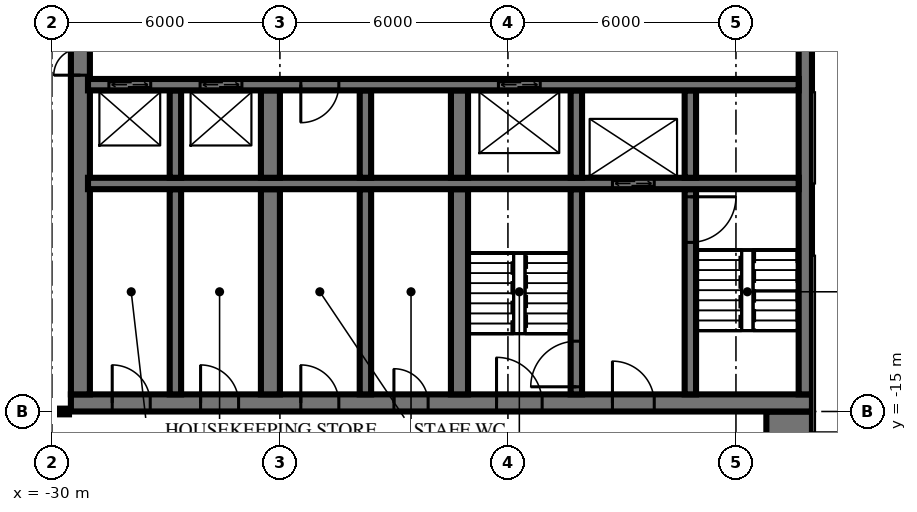
"""IFC4 building model, lengths in metres.
Left out: names, types, materials, properties, quantities, classifications, styles, units other than length and angle.
Written with IfcOpenShell. Run it as: python <this file> out.ifc"""

import sys

from ifc_helpers import new_model, si_unit, direction, frame, frame_2d, origin, place, context, subcontext, project, spatial, rectangle, extrude, element, fill, save


model = new_model("IFC4")
c1 = context("Model", 3, precision=1e-05, world=origin(), true_north=direction((0.0, 1.0)))
c2 = subcontext(c1, "Body", "Model", "MODEL_VIEW")
j1 = project(units=[si_unit("LENGTHUNIT", "METRE"), si_unit("PLANEANGLEUNIT", "RADIAN")], contexts=[c1])
p1 = place(None, origin())
s1 = spatial("IfcSite", under=j1, at=p1, CompositionType="ELEMENT")
p2 = place(p1, origin())
s2 = spatial("IfcBuilding", under=s1, at=p2, CompositionType="ELEMENT")
p3 = place(p2, frame((0.0, 0.0, 7.0)))
s3 = spatial("IfcBuildingStorey", under=s2, at=p3, CompositionType="ELEMENT", Elevation=7.0)
p4 = place(p3, frame((-29.5, -14.775, 0.0), z_axis=(0.0, 0.0, 1.0), x_axis=(1.0, 0.0, 0.0)))
e1 = element("IfcWall", 1, at=p4, inside=s3, PredefinedType="SHEAR", context=c2, shape_type="SweptSolid", body=[
    extrude(rectangle(XDim=19.5, YDim=0.45, at=frame_2d((9.75, 0.0))), origin(), (0.0, 0.0, 1.0), 5.5),
])
p5 = place(p4, frame((11.2, 0.0, 0.0)))
e2 = element("IfcOpeningElement", 2, at=p5, cuts=e1, PredefinedType="OPENING", context=c2, shape_type="SweptSolid", body=[
    extrude(rectangle(XDim=1.2, YDim=2.1, at=frame_2d((0.6, 1.05))), frame((0.0, 0.235, 0.0), z_axis=(0.0, -1.0, 0.0), x_axis=(1.0, 0.0, 0.0)), (0.0, 0.0, 1.0), 0.47),
])
p6 = place(p4, frame((14.25, 0.0, 0.0)))
e3 = element("IfcOpeningElement", 3, at=p6, cuts=e1, PredefinedType="OPENING", context=c2, shape_type="SweptSolid", body=[
    extrude(rectangle(XDim=1.1, YDim=2.1, at=frame_2d((0.55, 1.05))), frame((0.0, 0.235, 0.0), z_axis=(0.0, -1.0, 0.0), x_axis=(1.0, 0.0, 0.0)), (0.0, 0.0, 1.0), 0.47),
])
p7 = place(p4, frame((8.5, 0.0, 0.0)))
e4 = element("IfcOpeningElement", 4, at=p7, cuts=e1, PredefinedType="OPENING", context=c2, shape_type="SweptSolid", body=[
    extrude(rectangle(XDim=0.9, YDim=2.1, at=frame_2d((0.45, 1.05))), frame((0.0, 0.235, 0.0), z_axis=(0.0, -1.0, 0.0), x_axis=(1.0, 0.0, 0.0)), (0.0, 0.0, 1.0), 0.47),
])
p8 = place(p4, frame((6.05, 0.0, 0.0)))
e5 = element("IfcOpeningElement", 5, at=p8, cuts=e1, PredefinedType="OPENING", context=c2, shape_type="SweptSolid", body=[
    extrude(rectangle(XDim=1.0, YDim=2.1, at=frame_2d((0.5, 1.05))), frame((0.0, 0.235, 0.0), z_axis=(0.0, -1.0, 0.0), x_axis=(1.0, 0.0, 0.0)), (0.0, 0.0, 1.0), 0.47),
])
p9 = place(p4, frame((3.413, 0.0, 0.0)))
e6 = element("IfcOpeningElement", 6, at=p9, cuts=e1, PredefinedType="OPENING", context=c2, shape_type="SweptSolid", body=[
    extrude(rectangle(XDim=1.0, YDim=2.1, at=frame_2d((0.5, 1.05))), frame((0.0, 0.235, 0.0), z_axis=(0.0, -1.0, 0.0), x_axis=(1.0, 0.0, 0.0)), (0.0, 0.0, 1.0), 0.47),
])
p10 = place(p4, frame((1.087, 0.0, 0.0)))
e7 = element("IfcOpeningElement", 7, at=p10, cuts=e1, PredefinedType="OPENING", context=c2, shape_type="SweptSolid", body=[
    extrude(rectangle(XDim=1.0, YDim=2.1, at=frame_2d((0.5, 1.05))), frame((0.0, 0.235, 0.0), z_axis=(0.0, -1.0, 0.0), x_axis=(1.0, 0.0, 0.0)), (0.0, 0.0, 1.0), 0.47),
])
p11 = place(p3, frame((-10.175, -14.55, 0.0), z_axis=(0.0, 0.0, 1.0), x_axis=(0.0, 1.0, 0.0)))
e8 = element("IfcWall", 8, at=p11, inside=s3, PredefinedType="SHEAR", context=c2, shape_type="SweptSolid", body=[
    extrude(rectangle(XDim=14.1, YDim=0.35, at=frame_2d((7.05, 0.0))), origin(), (0.0, 0.0, 1.0), 5.5),
])
p12 = place(p3, frame((-29.25, -14.55, 0.0), z_axis=(0.0, 0.0, 1.0), x_axis=(0.0, 1.0, 0.0)))
e9 = element("IfcWall", 9, at=p12, inside=s3, PredefinedType="SHEAR", context=c2, shape_type="SweptSolid", body=[
    extrude(rectangle(XDim=14.1, YDim=0.5, at=frame_2d((7.05, 0.0))), origin(), (0.0, 0.0, 1.0), 5.5),
])
p13 = place(p12, frame((8.4, 0.0, 0.0)))
e10 = element("IfcOpeningElement", 10, at=p13, cuts=e9, PredefinedType="OPENING", context=c2, shape_type="SweptSolid", body=[
    extrude(rectangle(XDim=1.4, YDim=2.4, at=frame_2d((0.7, 1.2))), frame((0.0, 0.26, 0.0), z_axis=(0.0, -1.0, 0.0), x_axis=(1.0, 0.0, 0.0)), (0.0, 0.0, 1.0), 0.52),
])
p14 = place(p12, frame((10.0, 0.0, 0.0)))
e11 = element("IfcOpeningElement", 11, at=p14, cuts=e9, PredefinedType="OPENING", context=c2, shape_type="SweptSolid", body=[
    extrude(rectangle(XDim=1.4, YDim=2.4, at=frame_2d((0.7, 1.2))), frame((0.0, 0.26, 0.0), z_axis=(0.0, -1.0, 0.0), x_axis=(1.0, 0.0, 0.0)), (0.0, 0.0, 1.0), 0.52),
])
p15 = place(p3, frame((-29.05, -6.4, 0.0), z_axis=(0.0, 0.0, 1.0), x_axis=(1.0, 0.0, 0.0)))
e12 = element("IfcWall", 12, at=p15, inside=s3, PredefinedType="SHEAR", context=c2, shape_type="SweptSolid", body=[
    extrude(rectangle(XDim=18.7, YDim=0.3, at=frame_2d((9.35, 0.0))), origin(), (0.0, 0.0, 1.0), 5.5),
])
p16 = place(p15, frame((2.95, 0.0, 0.0)))
e13 = element("IfcOpeningElement", 13, at=p16, cuts=e12, PredefinedType="OPENING", context=c2, shape_type="SweptSolid", body=[
    extrude(rectangle(XDim=1.1, YDim=2.1, at=frame_2d((0.55, 1.05))), frame((0.0, 0.16, 0.0), z_axis=(0.0, -1.0, 0.0), x_axis=(1.0, 0.0, 0.0)), (0.0, 0.0, 1.0), 0.32),
])
p17 = place(p15, frame((0.55, 0.0, 0.0)))
e14 = element("IfcOpeningElement", 14, at=p17, cuts=e12, PredefinedType="OPENING", context=c2, shape_type="SweptSolid", body=[
    extrude(rectangle(XDim=1.1, YDim=2.1, at=frame_2d((0.55, 1.05))), frame((0.0, 0.16, 0.0), z_axis=(0.0, -1.0, 0.0), x_axis=(1.0, 0.0, 0.0)), (0.0, 0.0, 1.0), 0.32),
])
p18 = place(p15, frame((10.8, 0.0, 0.0)))
e15 = element("IfcOpeningElement", 15, at=p18, cuts=e12, PredefinedType="OPENING", context=c2, shape_type="SweptSolid", body=[
    extrude(rectangle(XDim=1.1, YDim=2.1, at=frame_2d((0.55, 1.05))), frame((0.0, 0.16, 0.0), z_axis=(0.0, -1.0, 0.0), x_axis=(1.0, 0.0, 0.0)), (0.0, 0.0, 1.0), 0.32),
])
p19 = place(p15, frame((5.6, 0.0, 0.0)))
e16 = element("IfcOpeningElement", 16, at=p19, cuts=e12, PredefinedType="OPENING", context=c2, shape_type="SweptSolid", body=[
    extrude(rectangle(XDim=1.0, YDim=2.1, at=frame_2d((0.5, 1.05))), frame((0.0, 0.16, 0.0), z_axis=(0.0, -1.0, 0.0), x_axis=(1.0, 0.0, 0.0)), (0.0, 0.0, 1.0), 0.32),
])
p20 = place(p3, frame((-29.05, -9.0, 0.0), z_axis=(0.0, 0.0, 1.0), x_axis=(1.0, 0.0, 0.0)))
e17 = element("IfcWall", 17, at=p20, inside=s3, PredefinedType="SHEAR", context=c2, shape_type="SweptSolid", body=[
    extrude(rectangle(XDim=18.7, YDim=0.3, at=frame_2d((9.35, 0.0))), origin(), (0.0, 0.0, 1.0), 5.5),
])
p21 = place(p20, frame((13.8, 0.0, 0.0)))
e18 = element("IfcOpeningElement", 18, at=p21, cuts=e17, PredefinedType="OPENING", context=c2, shape_type="SweptSolid", body=[
    extrude(rectangle(XDim=1.1, YDim=2.1, at=frame_2d((0.55, 1.05))), frame((0.0, 0.16, 0.0), z_axis=(0.0, -1.0, 0.0), x_axis=(1.0, 0.0, 0.0)), (0.0, 0.0, 1.0), 0.32),
])
p22 = place(p3, frame((-13.2, -8.85, 0.0), z_axis=(0.0, 0.0, 1.0), x_axis=(0.0, 1.0, 0.0)))
e19 = element("IfcWall", 19, at=p22, inside=s3, PredefinedType="SHEAR", context=c2, shape_type="SweptSolid", body=[
    extrude(rectangle(XDim=2.3, YDim=0.3, at=frame_2d((1.15, 0.0))), origin(), (0.0, 0.0, 1.0), 5.5),
])
p23 = place(p3, frame((-13.2, -14.55, 0.0), z_axis=(0.0, 0.0, 1.0), x_axis=(0.0, 1.0, 0.0)))
e20 = element("IfcWall", 20, at=p23, inside=s3, PredefinedType="SHEAR", context=c2, shape_type="SweptSolid", body=[
    extrude(rectangle(XDim=5.4, YDim=0.3, at=frame_2d((2.7, 0.0))), origin(), (0.0, 0.0, 1.0), 5.5),
])
p24 = place(p23, frame((4.0, 0.0, 0.0)))
e21 = element("IfcOpeningElement", 21, at=p24, cuts=e20, PredefinedType="OPENING", context=c2, shape_type="SweptSolid", body=[
    extrude(rectangle(XDim=1.2, YDim=2.1, at=frame_2d((0.6, 1.05))), frame((0.0, 0.16, 0.0), z_axis=(0.0, -1.0, 0.0), x_axis=(1.0, 0.0, 0.0)), (0.0, 0.0, 1.0), 0.32),
])
p25 = place(p3, frame((-16.2, -8.85, 0.0), z_axis=(0.0, 0.0, 1.0), x_axis=(0.0, 1.0, 0.0)))
e22 = element("IfcWall", 22, at=p25, inside=s3, PredefinedType="SHEAR", context=c2, shape_type="SweptSolid", body=[
    extrude(rectangle(XDim=2.3, YDim=0.3, at=frame_2d((1.15, 0.0))), origin(), (0.0, 0.0, 1.0), 5.5),
])
p26 = place(p3, frame((-16.2, -14.55, 0.0), z_axis=(0.0, 0.0, 1.0), x_axis=(0.0, 1.0, 0.0)))
e23 = element("IfcWall", 23, at=p26, inside=s3, PredefinedType="SHEAR", context=c2, shape_type="SweptSolid", body=[
    extrude(rectangle(XDim=5.4, YDim=0.3, at=frame_2d((2.7, 0.0))), origin(), (0.0, 0.0, 1.0), 5.5),
])
p27 = place(p26, frame((0.2, 0.0, 0.0)))
e24 = element("IfcOpeningElement", 24, at=p27, cuts=e23, PredefinedType="OPENING", context=c2, shape_type="SweptSolid", body=[
    extrude(rectangle(XDim=1.2, YDim=2.1, at=frame_2d((0.6, 1.05))), frame((0.0, 0.16, 0.0), z_axis=(0.0, -1.0, 0.0), x_axis=(1.0, 0.0, 0.0)), (0.0, 0.0, 1.0), 0.32),
])
p28 = place(p3, frame((-19.275, -8.85, 0.0), z_axis=(0.0, 0.0, 1.0), x_axis=(0.0, 1.0, 0.0)))
e25 = element("IfcWall", 25, at=p28, inside=s3, PredefinedType="SHEAR", context=c2, shape_type="SweptSolid", body=[
    extrude(rectangle(XDim=2.3, YDim=0.45, at=frame_2d((1.15, 0.0))), origin(), (0.0, 0.0, 1.0), 5.5),
])
p29 = place(p3, frame((-19.275, -14.55, 0.0), z_axis=(0.0, 0.0, 1.0), x_axis=(0.0, 1.0, 0.0)))
e26 = element("IfcWall", 26, at=p29, inside=s3, PredefinedType="SHEAR", context=c2, shape_type="SweptSolid", body=[
    extrude(rectangle(XDim=5.4, YDim=0.45, at=frame_2d((2.7, 0.0))), origin(), (0.0, 0.0, 1.0), 5.5),
])
p30 = place(p3, frame((-21.75, -8.85, 0.0), z_axis=(0.0, 0.0, 1.0), x_axis=(0.0, 1.0, 0.0)))
e27 = element("IfcWall", 27, at=p30, inside=s3, PredefinedType="SHEAR", context=c2, shape_type="SweptSolid", body=[
    extrude(rectangle(XDim=2.3, YDim=0.3, at=frame_2d((1.15, 0.0))), origin(), (0.0, 0.0, 1.0), 5.5),
])
p31 = place(p3, frame((-21.75, -14.55, 0.0), z_axis=(0.0, 0.0, 1.0), x_axis=(0.0, 1.0, 0.0)))
e28 = element("IfcWall", 28, at=p31, inside=s3, PredefinedType="SHEAR", context=c2, shape_type="SweptSolid", body=[
    extrude(rectangle(XDim=5.4, YDim=0.3, at=frame_2d((2.7, 0.0))), origin(), (0.0, 0.0, 1.0), 5.5),
])
p32 = place(p3, frame((-24.25, -8.85, 0.0), z_axis=(0.0, 0.0, 1.0), x_axis=(0.0, 1.0, 0.0)))
e29 = element("IfcWall", 29, at=p32, inside=s3, PredefinedType="SHEAR", context=c2, shape_type="SweptSolid", body=[
    extrude(rectangle(XDim=2.3, YDim=0.5, at=frame_2d((1.15, 0.0))), origin(), (0.0, 0.0, 1.0), 5.5),
])
p33 = place(p3, frame((-24.25, -14.55, 0.0), z_axis=(0.0, 0.0, 1.0), x_axis=(0.0, 1.0, 0.0)))
e30 = element("IfcWall", 30, at=p33, inside=s3, PredefinedType="SHEAR", context=c2, shape_type="SweptSolid", body=[
    extrude(rectangle(XDim=5.4, YDim=0.5, at=frame_2d((2.7, 0.0))), origin(), (0.0, 0.0, 1.0), 5.5),
])
p34 = place(p3, frame((-26.75, -8.85, 0.0), z_axis=(0.0, 0.0, 1.0), x_axis=(0.0, 1.0, 0.0)))
e31 = element("IfcWall", 31, at=p34, inside=s3, PredefinedType="SHEAR", context=c2, shape_type="SweptSolid", body=[
    extrude(rectangle(XDim=2.3, YDim=0.3, at=frame_2d((1.15, 0.0))), origin(), (0.0, 0.0, 1.0), 5.5),
])
p35 = place(p3, frame((-26.75, -14.55, 0.0), z_axis=(0.0, 0.0, 1.0), x_axis=(0.0, 1.0, 0.0)))
e32 = element("IfcWall", 32, at=p35, inside=s3, PredefinedType="SHEAR", context=c2, shape_type="SweptSolid", body=[
    extrude(rectangle(XDim=5.4, YDim=0.3, at=frame_2d((2.7, 0.0))), origin(), (0.0, 0.0, 1.0), 5.5),
])
p36 = place(p3, frame((-10.6, -40.0, 0.0), z_axis=(0.0, 0.0, 1.0), x_axis=(0.0, 1.0, 0.0)))
e33 = element("IfcWall", 33, at=p36, inside=s3, PredefinedType="SHEAR", context=c2, shape_type="SweptSolid", body=[
    extrude(rectangle(XDim=25.0, YDim=1.2, at=frame_2d((12.5, 0.0))), origin(), (0.0, 0.0, 1.0), 5.5),
])
p37 = place(p3, frame((-47.82, -15.0, 0.0), z_axis=(0.0, 0.0, 1.0), x_axis=(1.0, 0.0, 0.0)))
e34 = element("IfcWall", 34, at=p37, inside=s3, PredefinedType="PARTITIONING", context=c2, shape_type="SweptSolid", body=[
    extrude(rectangle(XDim=18.27, YDim=0.15, at=frame_2d((9.135, 0.0))), origin(), (0.0, 0.0, 1.0), 5.05),
])
p38 = place(p37, frame((1.62, 0.0, 0.0)))
e35 = element("IfcOpeningElement", 35, at=p38, cuts=e34, PredefinedType="OPENING", context=c2, shape_type="SweptSolid", body=[
    extrude(rectangle(XDim=1.0, YDim=2.1, at=frame_2d((0.5, 1.05))), frame((0.0, 0.085, 0.0), z_axis=(0.0, -1.0, 0.0), x_axis=(1.0, 0.0, 0.0)), (0.0, 0.0, 1.0), 0.17),
])
p39 = place(p37, frame((3.84, 0.0, 0.0)))
e36 = element("IfcOpeningElement", 36, at=p39, cuts=e34, PredefinedType="OPENING", context=c2, shape_type="SweptSolid", body=[
    extrude(rectangle(XDim=1.0, YDim=2.1, at=frame_2d((0.5, 1.05))), frame((0.0, 0.085, 0.0), z_axis=(0.0, -1.0, 0.0), x_axis=(1.0, 0.0, 0.0)), (0.0, 0.0, 1.0), 0.17),
])
p40 = place(p37, frame((8.34, 0.0, 0.0)))
e37 = element("IfcOpeningElement", 37, at=p40, cuts=e34, PredefinedType="OPENING", context=c2, shape_type="SweptSolid", body=[
    extrude(rectangle(XDim=1.0, YDim=2.1, at=frame_2d((0.5, 1.05))), frame((0.0, 0.085, 0.0), z_axis=(0.0, -1.0, 0.0), x_axis=(1.0, 0.0, 0.0)), (0.0, 0.0, 1.0), 0.17),
])
p41 = place(p37, frame((13.39, 0.0, 0.0)))
e38 = element("IfcOpeningElement", 38, at=p41, cuts=e34, PredefinedType="OPENING", context=c2, shape_type="SweptSolid", body=[
    extrude(rectangle(XDim=1.0, YDim=2.1, at=frame_2d((0.5, 1.05))), frame((0.0, 0.085, 0.0), z_axis=(0.0, -1.0, 0.0), x_axis=(1.0, 0.0, 0.0)), (0.0, 0.0, 1.0), 0.17),
])
p42 = place(p37, frame((16.62, 0.0, 0.0)))
e39 = element("IfcOpeningElement", 39, at=p42, cuts=e34, PredefinedType="OPENING", context=c2, shape_type="SweptSolid", body=[
    extrude(rectangle(XDim=1.0, YDim=2.1, at=frame_2d((0.5, 1.05))), frame((0.0, 0.085, 0.0), z_axis=(0.0, -1.0, 0.0), x_axis=(1.0, 0.0, 0.0)), (0.0, 0.0, 1.0), 0.17),
])
p43 = place(p16, origin())
e40 = element("IfcDoor", 40, at=p43, inside=s3, OperationType="DOUBLE_DOOR_SLIDING", PredefinedType="USERDEFINED", context=c2, shape_type="SweptSolid", body=[
    extrude(rectangle(XDim=1.1, YDim=2.1, at=frame_2d((0.55, 1.05))), frame((0.0, 0.025, 0.0), z_axis=(0.0, -1.0, 0.0), x_axis=(1.0, 0.0, 0.0)), (0.0, 0.0, 1.0), 0.05),
])
fill(e13, e40)
p44 = place(p17, origin())
e41 = element("IfcDoor", 41, at=p44, inside=s3, OperationType="DOUBLE_DOOR_SLIDING", PredefinedType="USERDEFINED", context=c2, shape_type="SweptSolid", body=[
    extrude(rectangle(XDim=1.1, YDim=2.1, at=frame_2d((0.55, 1.05))), frame((0.0, 0.025, 0.0), z_axis=(0.0, -1.0, 0.0), x_axis=(1.0, 0.0, 0.0)), (0.0, 0.0, 1.0), 0.05),
])
fill(e14, e41)
p45 = place(p21, origin())
e42 = element("IfcDoor", 42, at=p45, inside=s3, OperationType="DOUBLE_DOOR_SLIDING", PredefinedType="USERDEFINED", context=c2, shape_type="SweptSolid", body=[
    extrude(rectangle(XDim=1.1, YDim=2.1, at=frame_2d((0.55, 1.05))), frame((0.0, 0.025, 0.0), z_axis=(0.0, -1.0, 0.0), x_axis=(1.0, 0.0, 0.0)), (0.0, 0.0, 1.0), 0.05),
])
fill(e18, e42)
p46 = place(p18, origin())
e43 = element("IfcDoor", 43, at=p46, inside=s3, OperationType="DOUBLE_DOOR_SLIDING", PredefinedType="USERDEFINED", context=c2, shape_type="SweptSolid", body=[
    extrude(rectangle(XDim=1.1, YDim=2.1, at=frame_2d((0.55, 1.05))), frame((0.0, 0.025, 0.0), z_axis=(0.0, -1.0, 0.0), x_axis=(1.0, 0.0, 0.0)), (0.0, 0.0, 1.0), 0.05),
])
fill(e15, e43)
p47 = place(p13, origin())
e44 = element("IfcDoor", 44, at=p47, inside=s3, OperationType="DOUBLE_DOOR_SINGLE_SWING", PredefinedType="DOOR", context=c2, shape_type="SweptSolid", body=[
    extrude(rectangle(XDim=1.4, YDim=2.4, at=frame_2d((0.7, 1.2))), frame((0.0, 0.025, 0.0), z_axis=(0.0, -1.0, 0.0), x_axis=(1.0, 0.0, 0.0)), (0.0, 0.0, 1.0), 0.05),
])
fill(e10, e44)
p48 = place(p5, origin())
e45 = element("IfcDoor", 45, at=p48, inside=s3, OperationType="SINGLE_SWING_RIGHT", PredefinedType="DOOR", context=c2, shape_type="SweptSolid", body=[
    extrude(rectangle(XDim=1.2, YDim=2.1, at=frame_2d((0.6, 1.05))), frame((0.0, 0.025, 0.0), z_axis=(0.0, -1.0, 0.0), x_axis=(1.0, 0.0, 0.0)), (0.0, 0.0, 1.0), 0.05),
])
fill(e2, e45)
p49 = place(p6, origin())
e46 = element("IfcDoor", 46, at=p49, inside=s3, OperationType="SINGLE_SWING_RIGHT", PredefinedType="DOOR", context=c2, shape_type="SweptSolid", body=[
    extrude(rectangle(XDim=1.1, YDim=2.1, at=frame_2d((0.55, 1.05))), frame((0.0, 0.025, 0.0), z_axis=(0.0, -1.0, 0.0), x_axis=(1.0, 0.0, 0.0)), (0.0, 0.0, 1.0), 0.05),
])
fill(e3, e46)
p50 = place(p7, origin())
e47 = element("IfcDoor", 47, at=p50, inside=s3, OperationType="SINGLE_SWING_RIGHT", PredefinedType="DOOR", context=c2, shape_type="SweptSolid", body=[
    extrude(rectangle(XDim=0.9, YDim=2.1, at=frame_2d((0.45, 1.05))), frame((0.0, 0.025, 0.0), z_axis=(0.0, -1.0, 0.0), x_axis=(1.0, 0.0, 0.0)), (0.0, 0.0, 1.0), 0.05),
])
fill(e4, e47)
p51 = place(p8, origin())
e48 = element("IfcDoor", 48, at=p51, inside=s3, OperationType="SINGLE_SWING_RIGHT", PredefinedType="DOOR", context=c2, shape_type="SweptSolid", body=[
    extrude(rectangle(XDim=1.0, YDim=2.1, at=frame_2d((0.5, 1.05))), frame((0.0, 0.025, 0.0), z_axis=(0.0, -1.0, 0.0), x_axis=(1.0, 0.0, 0.0)), (0.0, 0.0, 1.0), 0.05),
])
fill(e5, e48)
p52 = place(p9, origin())
e49 = element("IfcDoor", 49, at=p52, inside=s3, OperationType="SINGLE_SWING_RIGHT", PredefinedType="DOOR", context=c2, shape_type="SweptSolid", body=[
    extrude(rectangle(XDim=1.0, YDim=2.1, at=frame_2d((0.5, 1.05))), frame((0.0, 0.025, 0.0), z_axis=(0.0, -1.0, 0.0), x_axis=(1.0, 0.0, 0.0)), (0.0, 0.0, 1.0), 0.05),
])
fill(e6, e49)
p53 = place(p10, origin())
e50 = element("IfcDoor", 50, at=p53, inside=s3, OperationType="SINGLE_SWING_RIGHT", PredefinedType="DOOR", context=c2, shape_type="SweptSolid", body=[
    extrude(rectangle(XDim=1.0, YDim=2.1, at=frame_2d((0.5, 1.05))), frame((0.0, 0.025, 0.0), z_axis=(0.0, -1.0, 0.0), x_axis=(1.0, 0.0, 0.0)), (0.0, 0.0, 1.0), 0.05),
])
fill(e7, e50)
p54 = place(p19, frame((0.5, 0.0, 0.0), z_axis=(0.0, 0.0, 1.0), x_axis=(-1.0, 0.0, 0.0)))
e51 = element("IfcDoor", 51, at=p54, inside=s3, OperationType="SINGLE_SWING_LEFT", PredefinedType="DOOR", context=c2, shape_type="SweptSolid", body=[
    extrude(rectangle(XDim=1.0, YDim=2.1, at=frame_2d((0.0, 1.05))), frame((0.0, -0.025, 0.0), z_axis=(0.0, 1.0, 0.0), x_axis=(-1.0, 0.0, 0.0)), (0.0, 0.0, 1.0), 0.05),
])
fill(e16, e51)
p55 = place(p24, frame((0.6, 0.0, 0.0), z_axis=(0.0, 0.0, 1.0), x_axis=(-1.0, 0.0, 0.0)))
e52 = element("IfcDoor", 52, at=p55, inside=s3, OperationType="SINGLE_SWING_RIGHT", PredefinedType="DOOR", context=c2, shape_type="SweptSolid", body=[
    extrude(rectangle(XDim=1.2, YDim=2.1, at=frame_2d((0.0, 1.05))), frame((0.0, -0.025, 0.0), z_axis=(0.0, 1.0, 0.0), x_axis=(-1.0, 0.0, 0.0)), (0.0, 0.0, 1.0), 0.05),
])
fill(e21, e52)
p56 = place(p27, origin())
e53 = element("IfcDoor", 53, at=p56, inside=s3, OperationType="SINGLE_SWING_RIGHT", PredefinedType="DOOR", context=c2, shape_type="SweptSolid", body=[
    extrude(rectangle(XDim=1.2, YDim=2.1, at=frame_2d((0.6, 1.05))), frame((0.0, 0.025, 0.0), z_axis=(0.0, -1.0, 0.0), x_axis=(1.0, 0.0, 0.0)), (0.0, 0.0, 1.0), 0.05),
])
fill(e24, e53)
save(model, sys.argv[1])
